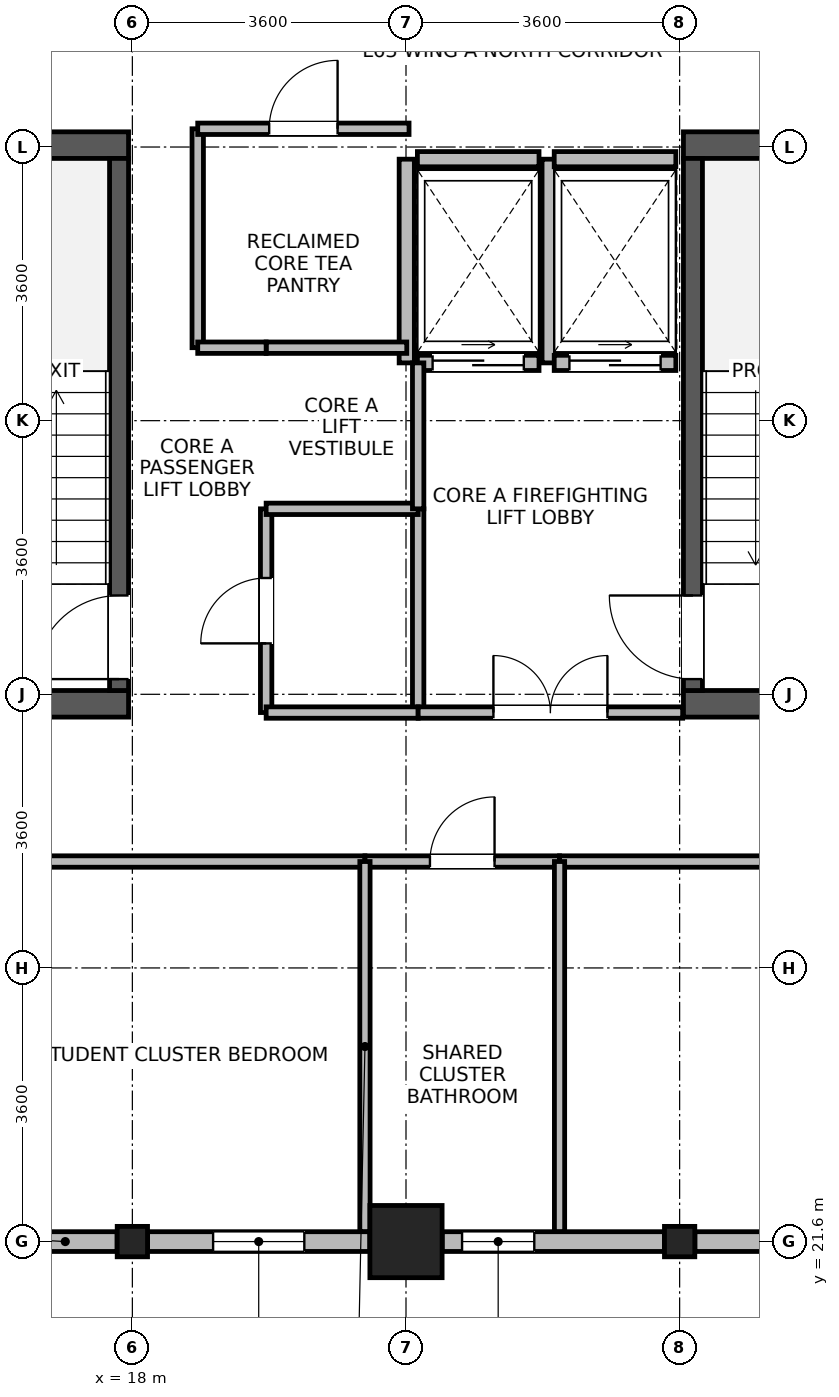
"""IFC4 building model, lengths in metres.
Left out: names, types, materials, properties, quantities, classifications, styles, units other than length and angle.
Written with IfcOpenShell. Run it as: python <this file> out.ifc"""

import sys

from ifc_helpers import new_model, si_unit, direction, frame, frame_2d, origin, origin_2d, place, context, subcontext, project, spatial, rectangle, i_section, extrude, source, transform, mapped, element, fill, save


model = new_model("IFC4")
c1 = context("Model", 3, precision=1e-05, world=origin(), true_north=direction((0.0, 1.0)))
c2 = subcontext(c1, "Body", "Model", "MODEL_VIEW")
j1 = project(units=[si_unit("LENGTHUNIT", "METRE"), si_unit("PLANEANGLEUNIT", "RADIAN")], contexts=[c1])
p1 = place(None, origin())
s1 = spatial("IfcSite", under=j1, at=p1, CompositionType="ELEMENT")
p2 = place(p1, origin())
s2 = spatial("IfcBuilding", under=s1, at=p2, CompositionType="ELEMENT")
p3 = place(p2, frame((0.0, 0.0, 246.2)))
s3 = spatial("IfcBuildingStorey", under=s2, at=p3, CompositionType="ELEMENT", Elevation=246.2)
for number, where, z_axis, x_axis in (
    (1, (14.75, 28.675, 0.0), (0.0, 0.0, 1.0), (1.0, 0.0, 0.0)),
    (2, (25.25, 28.675, 0.0), (0.0, 0.0, 1.0), (1.0, 0.0, 0.0)),
    (3, (14.75, 36.025, 0.0), (0.0, 0.0, 1.0), (1.0, 0.0, 0.0)),
    (4, (25.25, 36.025, 0.0), (0.0, 0.0, 1.0), (1.0, 0.0, 0.0)),
):
    element("IfcWall", number, at=place(p3, frame(where, z_axis=z_axis, x_axis=x_axis)), inside=s3, PredefinedType="SHEAR", context=c2, shape_type="SweptSolid", body=[
        extrude(rectangle(XDim=3.2, YDim=0.35, at=frame_2d((1.6, 0.0))), origin(), (0.0, 0.0, 1.0), 3.28),
    ])
p4 = place(p3, frame((17.825, 28.85, 0.0), z_axis=(0.0, 0.0, 1.0), x_axis=(0.0, 1.0, 0.0)))
e5 = element("IfcWall", 5, at=p4, inside=s3, PredefinedType="SHEAR", context=c2, shape_type="SweptSolid", body=[
    extrude(rectangle(XDim=7.0, YDim=0.25, at=frame_2d((3.5, 0.0))), origin(), (0.0, 0.0, 1.0), 3.28),
])
p5 = place(p4, frame((0.15, 0.0, 0.0)))
e6 = element("IfcOpeningElement", 6, at=p5, cuts=e5, PredefinedType="OPENING", context=c2, shape_type="SweptSolid", body=[
    extrude(rectangle(XDim=1.1, YDim=2.08, at=frame_2d((0.55, 1.04))), frame((0.0, 0.135, 0.0), z_axis=(0.0, -1.0, 0.0), x_axis=(1.0, 0.0, 0.0)), (0.0, 0.0, 1.0), 0.27),
])
p6 = place(p3, frame((25.375, 28.85, 0.0), z_axis=(0.0, 0.0, 1.0), x_axis=(0.0, 1.0, 0.0)))
e7 = element("IfcWall", 7, at=p6, inside=s3, PredefinedType="SHEAR", context=c2, shape_type="SweptSolid", body=[
    extrude(rectangle(XDim=7.0, YDim=0.25, at=frame_2d((3.5, 0.0))), origin(), (0.0, 0.0, 1.0), 3.28),
])
p7 = place(p6, frame((0.15, 0.0, 0.0)))
e8 = element("IfcOpeningElement", 8, at=p7, cuts=e7, PredefinedType="OPENING", context=c2, shape_type="SweptSolid", body=[
    extrude(rectangle(XDim=1.1, YDim=2.08, at=frame_2d((0.55, 1.04))), frame((0.0, 0.135, 0.0), z_axis=(0.0, -1.0, 0.0), x_axis=(1.0, 0.0, 0.0)), (0.0, 0.0, 1.0), 0.27),
])
m1 = source(origin(), c2, "Body", "SweptSolid", [
    extrude(rectangle(XDim=0.95, YDim=0.95, at=origin_2d()), origin(), (0.0, 0.0, 1.0), 3.7),
])
p8 = place(p3, frame((21.6, 21.6, 0.0), z_axis=(0.0, 0.0, 1.0), x_axis=(1.0, 0.0, 0.0)))
e9 = element("IfcColumn", 9, at=p8, inside=s3, PredefinedType="COLUMN", context=c2, shape_type="MappedRepresentation", body=[
    mapped(m1, transform((0.0, 0.0, 0.0), x_axis=(1.0, 0.0, 0.0), y_axis=(0.0, 1.0, 0.0), z_axis=(0.0, 0.0, 1.0), scale=1.0)),
])
m2 = source(origin(), c2, "Body", "SweptSolid", [
    extrude(i_section(OverallWidth=0.399, OverallDepth=0.4, WebThickness=0.017, FlangeThickness=0.023, FilletRadius=0.015, at=origin_2d()), origin(), (0.0, 0.0, 1.0), 3.7),
])
for number, where, z_axis, x_axis in (
    (10, (18.0, 21.6, 0.0), (0.0, 0.0, 1.0), (1.0, 0.0, 0.0)),
    (11, (25.2, 21.6, 0.0), (0.0, 0.0, 1.0), (1.0, 0.0, 0.0)),
):
    element("IfcColumn", number, at=place(p3, frame(where, z_axis=z_axis, x_axis=x_axis)), inside=s3, PredefinedType="COLUMN", context=c2, shape_type="MappedRepresentation", body=[
        mapped(m2, transform((0.0, 0.0, 0.0), x_axis=(1.0, 0.0, 0.0), y_axis=(0.0, 1.0, 0.0), z_axis=(0.0, 0.0, 1.0), scale=1.0)),
    ])
p9 = place(p3, frame((17.8, 21.6, 0.0), z_axis=(0.0, 0.0, 1.0), x_axis=(-1.0, 0.0, 0.0)))
e12 = element("IfcWall", 12, at=p9, inside=s3, PredefinedType="STANDARD", context=c2, shape_type="SweptSolid", body=[
    extrude(rectangle(XDim=1.365, YDim=0.26, at=frame_2d((0.682, 0.0))), origin(), (0.0, 0.0, 1.0), 2.86),
])
p10 = place(p3, frame((21.124, 21.6, 0.0), z_axis=(0.0, 0.0, 1.0), x_axis=(-1.0, 0.0, 0.0)))
e13 = element("IfcWall", 13, at=p10, inside=s3, PredefinedType="STANDARD", context=c2, shape_type="SweptSolid", body=[
    extrude(rectangle(XDim=2.924, YDim=0.26, at=frame_2d((1.462, 0.0))), origin(), (0.0, 0.0, 1.0), 2.86),
])
p11 = place(p10, frame((0.862, 0.0, 0.85)))
e14 = element("IfcOpeningElement", 14, at=p11, cuts=e13, PredefinedType="OPENING", context=c2, shape_type="SweptSolid", body=[
    extrude(rectangle(XDim=1.2, YDim=1.75, at=frame_2d((0.6, 0.875))), frame((0.0, 0.14, 0.0), z_axis=(0.0, -1.0, 0.0), x_axis=(1.0, 0.0, 0.0)), (0.0, 0.0, 1.0), 0.28),
])
p12 = place(p3, frame((25.0, 21.6, 0.0), z_axis=(0.0, 0.0, 1.0), x_axis=(-1.0, 0.0, 0.0)))
e15 = element("IfcWall", 15, at=p12, inside=s3, PredefinedType="STANDARD", context=c2, shape_type="SweptSolid", body=[
    extrude(rectangle(XDim=2.924, YDim=0.26, at=frame_2d((1.462, 0.0))), origin(), (0.0, 0.0, 1.0), 2.86),
])
p13 = place(p12, frame((1.712, 0.0, 0.85)))
e16 = element("IfcOpeningElement", 16, at=p13, cuts=e15, PredefinedType="OPENING", context=c2, shape_type="SweptSolid", body=[
    extrude(rectangle(XDim=0.95, YDim=1.75, at=frame_2d((0.475, 0.875))), frame((0.0, 0.14, 0.0), z_axis=(0.0, -1.0, 0.0), x_axis=(1.0, 0.0, 0.0)), (0.0, 0.0, 1.0), 0.28),
])
p14 = place(p3, frame((28.324, 21.6, 0.0), z_axis=(0.0, 0.0, 1.0), x_axis=(-1.0, 0.0, 0.0)))
e17 = element("IfcWall", 17, at=p14, inside=s3, PredefinedType="STANDARD", context=c2, shape_type="SweptSolid", body=[
    extrude(rectangle(XDim=2.924, YDim=0.26, at=frame_2d((1.462, 0.0))), origin(), (0.0, 0.0, 1.0), 2.86),
])
p15 = place(p14, frame((0.862, 0.0, 0.85)))
e18 = element("IfcOpeningElement", 18, at=p15, cuts=e17, PredefinedType="OPENING", context=c2, shape_type="SweptSolid", body=[
    extrude(rectangle(XDim=1.2, YDim=1.75, at=frame_2d((0.6, 0.875))), frame((0.0, 0.14, 0.0), z_axis=(0.0, -1.0, 0.0), x_axis=(1.0, 0.0, 0.0)), (0.0, 0.0, 1.0), 0.28),
])
p16 = place(p3, frame((21.75, 33.16, 0.0), z_axis=(0.0, 0.0, 1.0), x_axis=(1.0, 0.0, 0.0)))
e19 = element("IfcWall", 19, at=p16, inside=s3, PredefinedType="PARTITIONING", context=c2, shape_type="SweptSolid", body=[
    extrude(rectangle(XDim=1.6, YDim=0.2, at=frame_2d((0.8, 0.0))), origin(), (0.0, 0.0, 1.0), 3.26),
])
p17 = place(p16, frame((0.2, 0.0, 0.0)))
e20 = element("IfcOpeningElement", 20, at=p17, cuts=e19, PredefinedType="OPENING", context=c2, shape_type="SweptSolid", body=[
    extrude(rectangle(XDim=1.2, YDim=2.12, at=frame_2d((0.6, 1.06))), frame((0.0, 0.11, 0.0), z_axis=(0.0, -1.0, 0.0), x_axis=(1.0, 0.0, 0.0)), (0.0, 0.0, 1.0), 0.22),
])
p18 = place(p3, frame((21.75, 35.84, 0.0), z_axis=(0.0, 0.0, 1.0), x_axis=(1.0, 0.0, 0.0)))
e21 = element("IfcWall", 21, at=p18, inside=s3, PredefinedType="PARTITIONING", context=c2, shape_type="SweptSolid", body=[
    extrude(rectangle(XDim=1.6, YDim=0.2, at=frame_2d((0.8, 0.0))), origin(), (0.0, 0.0, 1.0), 2.36),
])
for number, where, z_axis, x_axis in (
    (22, (21.61, 33.16, 0.0), (0.0, 0.0, 1.0), (0.0, 1.0, 0.0)),
    (23, (23.49, 33.16, 0.0), (0.0, 0.0, 1.0), (0.0, 1.0, 0.0)),
):
    element("IfcWall", number, at=place(p3, frame(where, z_axis=z_axis, x_axis=x_axis)), inside=s3, PredefinedType="PARTITIONING", context=c2, shape_type="SweptSolid", body=[
        extrude(rectangle(XDim=2.68, YDim=0.2, at=frame_2d((1.34, 0.0))), origin(), (0.0, 0.0, 1.0), 3.26),
    ])
p19 = place(p3, frame((23.55, 33.16, 0.0), z_axis=(0.0, 0.0, 1.0), x_axis=(1.0, 0.0, 0.0)))
e24 = element("IfcWall", 24, at=p19, inside=s3, PredefinedType="PARTITIONING", context=c2, shape_type="SweptSolid", body=[
    extrude(rectangle(XDim=1.6, YDim=0.2, at=frame_2d((0.8, 0.0))), origin(), (0.0, 0.0, 1.0), 3.26),
])
p20 = place(p19, frame((0.2, 0.0, 0.0)))
e25 = element("IfcOpeningElement", 25, at=p20, cuts=e24, PredefinedType="OPENING", context=c2, shape_type="SweptSolid", body=[
    extrude(rectangle(XDim=1.2, YDim=2.12, at=frame_2d((0.6, 1.06))), frame((0.0, 0.11, 0.0), z_axis=(0.0, -1.0, 0.0), x_axis=(1.0, 0.0, 0.0)), (0.0, 0.0, 1.0), 0.22),
])
p21 = place(p3, frame((23.55, 35.84, 0.0), z_axis=(0.0, 0.0, 1.0), x_axis=(1.0, 0.0, 0.0)))
e26 = element("IfcWall", 26, at=p21, inside=s3, PredefinedType="PARTITIONING", context=c2, shape_type="SweptSolid", body=[
    extrude(rectangle(XDim=1.6, YDim=0.2, at=frame_2d((0.8, 0.0))), origin(), (0.0, 0.0, 1.0), 2.36),
])
p22 = place(p3, frame((23.62, 26.6, 0.0), z_axis=(0.0, 0.0, 1.0), x_axis=(1.0, 0.0, 0.0)))
e27 = element("IfcWall", 27, at=p22, inside=s3, PredefinedType="PARTITIONING", context=c2, shape_type="SweptSolid", body=[
    extrude(rectangle(XDim=15.46, YDim=0.15, at=frame_2d((7.73, 0.0))), origin(), (0.0, 0.0, 1.0), 3.26),
])
p23 = place(p22, frame((7.255, 0.0, 0.0)))
e28 = element("IfcOpeningElement", 28, at=p23, cuts=e27, PredefinedType="OPENING", context=c2, shape_type="SweptSolid", body=[
    extrude(rectangle(XDim=0.95, YDim=2.1, at=frame_2d((0.475, 1.05))), frame((0.0, 0.085, 0.0), z_axis=(0.0, -1.0, 0.0), x_axis=(1.0, 0.0, 0.0)), (0.0, 0.0, 1.0), 0.17),
])
p24 = place(p3, frame((6.832, 26.6, 0.0), z_axis=(0.0, 0.0, 1.0), x_axis=(1.0, 0.0, 0.0)))
e29 = element("IfcWall", 29, at=p24, inside=s3, PredefinedType="PARTITIONING", context=c2, shape_type="SweptSolid", body=[
    extrude(rectangle(XDim=14.228, YDim=0.15, at=frame_2d((7.114, 0.0))), origin(), (0.0, 0.0, 1.0), 3.26),
])
p25 = place(p24, frame((6.639, 0.0, 0.0)))
e30 = element("IfcOpeningElement", 30, at=p25, cuts=e29, PredefinedType="OPENING", context=c2, shape_type="SweptSolid", body=[
    extrude(rectangle(XDim=0.95, YDim=2.1, at=frame_2d((0.475, 1.05))), frame((0.0, 0.085, 0.0), z_axis=(0.0, -1.0, 0.0), x_axis=(1.0, 0.0, 0.0)), (0.0, 0.0, 1.0), 0.17),
])
p26 = place(p3, frame((18.86, 33.36, 0.0), z_axis=(0.0, 0.0, 1.0), x_axis=(0.0, 1.0, 0.0)))
e31 = element("IfcWall", 31, at=p26, inside=s3, PredefinedType="PARTITIONING", context=c2, shape_type="SweptSolid", body=[
    extrude(rectangle(XDim=2.88, YDim=0.15, at=frame_2d((1.44, 0.0))), origin(), (0.0, 0.0, 1.0), 3.26),
])
p27 = place(p3, frame((18.86, 36.24, 0.0), z_axis=(0.0, 0.0, 1.0), x_axis=(1.0, 0.0, 0.0)))
e32 = element("IfcWall", 32, at=p27, inside=s3, PredefinedType="PARTITIONING", context=c2, shape_type="SweptSolid", body=[
    extrude(rectangle(XDim=2.78, YDim=0.15, at=frame_2d((1.39, 0.0))), origin(), (0.0, 0.0, 1.0), 2.36),
])
p28 = place(p27, frame((0.94, 0.0, 0.0)))
e33 = element("IfcOpeningElement", 33, at=p28, cuts=e32, PredefinedType="OPENING", context=c2, shape_type="SweptSolid", body=[
    extrude(rectangle(XDim=0.9, YDim=2.08, at=frame_2d((0.45, 1.04))), frame((0.0, 0.085, 0.0), z_axis=(0.0, -1.0, 0.0), x_axis=(1.0, 0.0, 0.0)), (0.0, 0.0, 1.0), 0.17),
])
p29 = place(p3, frame((19.76, 28.56, 0.0), z_axis=(0.0, 0.0, 1.0), x_axis=(0.0, 1.0, 0.0)))
e34 = element("IfcWall", 34, at=p29, inside=s3, PredefinedType="PARTITIONING", context=c2, shape_type="SweptSolid", body=[
    extrude(rectangle(XDim=2.68, YDim=0.15, at=frame_2d((1.34, 0.0))), origin(), (0.0, 0.0, 1.0), 3.26),
])
p30 = place(p29, frame((0.91, 0.0, 0.0)))
e35 = element("IfcOpeningElement", 35, at=p30, cuts=e34, PredefinedType="OPENING", context=c2, shape_type="SweptSolid", body=[
    extrude(rectangle(XDim=0.86, YDim=2.02, at=frame_2d((0.43, 1.01))), frame((0.0, 0.085, 0.0), z_axis=(0.0, -1.0, 0.0), x_axis=(1.0, 0.0, 0.0)), (0.0, 0.0, 1.0), 0.17),
])
p31 = place(p3, frame((21.76, 28.56, 0.0), z_axis=(0.0, 0.0, 1.0), x_axis=(0.0, 1.0, 0.0)))
e36 = element("IfcWall", 36, at=p31, inside=s3, PredefinedType="PARTITIONING", context=c2, shape_type="SweptSolid", body=[
    extrude(rectangle(XDim=2.68, YDim=0.15, at=frame_2d((1.34, 0.0))), origin(), (0.0, 0.0, 1.0), 3.26),
])
p32 = place(p3, frame((21.06, 26.6, 0.0), z_axis=(0.0, 0.0, 1.0), x_axis=(1.0, 0.0, 0.0)))
e37 = element("IfcWall", 37, at=p32, inside=s3, PredefinedType="PARTITIONING", context=c2, shape_type="SweptSolid", body=[
    extrude(rectangle(XDim=2.56, YDim=0.15, at=frame_2d((1.28, 0.0))), origin(), (0.0, 0.0, 1.0), 3.26),
])
p33 = place(p32, frame((0.855, 0.0, 0.0)))
e38 = element("IfcOpeningElement", 38, at=p33, cuts=e37, PredefinedType="OPENING", context=c2, shape_type="SweptSolid", body=[
    extrude(rectangle(XDim=0.85, YDim=2.04, at=frame_2d((0.425, 1.02))), frame((0.0, 0.085, 0.0), z_axis=(0.0, -1.0, 0.0), x_axis=(1.0, 0.0, 0.0)), (0.0, 0.0, 1.0), 0.17),
])
p34 = place(p3, frame((19.76, 28.56, 0.0), z_axis=(0.0, 0.0, 1.0), x_axis=(1.0, 0.0, 0.0)))
e39 = element("IfcWall", 39, at=p34, inside=s3, PredefinedType="PARTITIONING", context=c2, shape_type="SweptSolid", body=[
    extrude(rectangle(XDim=2.0, YDim=0.15, at=frame_2d((1.0, 0.0))), origin(), (0.0, 0.0, 1.0), 2.36),
])
p35 = place(p3, frame((19.76, 31.24, 0.0), z_axis=(0.0, 0.0, 1.0), x_axis=(1.0, 0.0, 0.0)))
e40 = element("IfcWall", 40, at=p35, inside=s3, PredefinedType="PARTITIONING", context=c2, shape_type="SweptSolid", body=[
    extrude(rectangle(XDim=2.0, YDim=0.15, at=frame_2d((1.0, 0.0))), origin(), (0.0, 0.0, 1.0), 3.26),
])
p36 = place(p3, frame((19.76, 33.36, 0.0), z_axis=(0.0, 0.0, 1.0), x_axis=(1.0, 0.0, 0.0)))
e41 = element("IfcWall", 41, at=p36, inside=s3, PredefinedType="PARTITIONING", context=c2, shape_type="SweptSolid", body=[
    extrude(rectangle(XDim=1.85, YDim=0.15, at=frame_2d((0.925, 0.0))), origin(), (0.0, 0.0, 1.0), 3.26),
])
p37 = place(p3, frame((18.86, 33.36, 0.0), z_axis=(0.0, 0.0, 1.0), x_axis=(1.0, 0.0, 0.0)))
e42 = element("IfcWall", 42, at=p37, inside=s3, PredefinedType="PARTITIONING", context=c2, shape_type="SweptSolid", body=[
    extrude(rectangle(XDim=0.9, YDim=0.15, at=frame_2d((0.45, 0.0))), origin(), (0.0, 0.0, 1.0), 3.26),
])
for number, where, z_axis, x_axis in (
    (43, (21.06, 21.732, 0.0), (0.0, 0.0, 1.0), (0.0, 1.0, 0.0)),
    (44, (23.62, 21.732, 0.0), (0.0, 0.0, 1.0), (0.0, 1.0, 0.0)),
):
    element("IfcWall", number, at=place(p3, frame(where, z_axis=z_axis, x_axis=x_axis)), inside=s3, PredefinedType="PARTITIONING", context=c2, shape_type="SweptSolid", body=[
        extrude(rectangle(XDim=4.868, YDim=0.135, at=frame_2d((2.434, 0.0))), origin(), (0.0, 0.0, 1.0), 3.26),
    ])
p38 = place(p3, frame((21.76, 28.56, 0.0), z_axis=(0.0, 0.0, 1.0), x_axis=(1.0, 0.0, 0.0)))
e45 = element("IfcWall", 45, at=p38, inside=s3, PredefinedType="PARTITIONING", context=c2, shape_type="SweptSolid", body=[
    extrude(rectangle(XDim=3.48, YDim=0.15, at=frame_2d((1.74, 0.0))), origin(), (0.0, 0.0, 1.0), 2.36),
])
p39 = place(p38, frame((0.99, 0.0, 0.0)))
e46 = element("IfcOpeningElement", 46, at=p39, cuts=e45, PredefinedType="OPENING", context=c2, shape_type="SweptSolid", body=[
    extrude(rectangle(XDim=1.5, YDim=2.1, at=frame_2d((0.75, 1.05))), frame((0.0, 0.085, 0.0), z_axis=(0.0, -1.0, 0.0), x_axis=(1.0, 0.0, 0.0)), (0.0, 0.0, 1.0), 0.17),
])
p40 = place(p3, frame((21.76, 31.24, 0.0), z_axis=(0.0, 0.0, 1.0), x_axis=(0.0, 1.0, 0.0)))
e47 = element("IfcWall", 47, at=p40, inside=s3, PredefinedType="PARTITIONING", context=c2, shape_type="SweptSolid", body=[
    extrude(rectangle(XDim=1.92, YDim=0.15, at=frame_2d((0.96, 0.0))), origin(), (0.0, 0.0, 1.0), 3.26),
])
p41 = place(p11, origin())
e48 = element("IfcWindow", 48, at=p41, inside=s3, PartitioningType="SINGLE_PANEL", PredefinedType="WINDOW", context=c2, shape_type="SweptSolid", body=[
    extrude(rectangle(XDim=1.2, YDim=1.75, at=frame_2d((0.6, 0.875))), frame((0.0, 0.03, 0.0), z_axis=(0.0, -1.0, 0.0), x_axis=(1.0, 0.0, 0.0)), (0.0, 0.0, 1.0), 0.06),
])
fill(e14, e48)
p42 = place(p13, origin())
e49 = element("IfcWindow", 49, at=p42, inside=s3, PartitioningType="SINGLE_PANEL", PredefinedType="WINDOW", context=c2, shape_type="SweptSolid", body=[
    extrude(rectangle(XDim=0.95, YDim=1.75, at=frame_2d((0.475, 0.875))), frame((0.0, 0.03, 0.0), z_axis=(0.0, -1.0, 0.0), x_axis=(1.0, 0.0, 0.0)), (0.0, 0.0, 1.0), 0.06),
])
fill(e16, e49)
p43 = place(p5, origin())
e50 = element("IfcDoor", 50, at=p43, inside=s3, OperationType="SINGLE_SWING_LEFT", PredefinedType="DOOR", context=c2, shape_type="SweptSolid", body=[
    extrude(rectangle(XDim=1.1, YDim=2.08, at=frame_2d((0.55, 1.04))), frame((0.0, 0.025, 0.0), z_axis=(0.0, -1.0, 0.0), x_axis=(1.0, 0.0, 0.0)), (0.0, 0.0, 1.0), 0.05),
])
fill(e6, e50)
p44 = place(p7, origin())
e51 = element("IfcDoor", 51, at=p44, inside=s3, OperationType="SINGLE_SWING_RIGHT", PredefinedType="DOOR", context=c2, shape_type="SweptSolid", body=[
    extrude(rectangle(XDim=1.1, YDim=2.08, at=frame_2d((0.55, 1.04))), frame((0.0, 0.025, 0.0), z_axis=(0.0, -1.0, 0.0), x_axis=(1.0, 0.0, 0.0)), (0.0, 0.0, 1.0), 0.05),
])
fill(e8, e51)
p45 = place(p17, origin())
e52 = element("IfcDoor", 52, at=p45, inside=s3, OperationType="SLIDING_TO_RIGHT", PredefinedType="DOOR", context=c2, shape_type="SweptSolid", body=[
    extrude(rectangle(XDim=1.2, YDim=2.12, at=frame_2d((0.6, 1.06))), frame((0.0, 0.025, 0.0), z_axis=(0.0, -1.0, 0.0), x_axis=(1.0, 0.0, 0.0)), (0.0, 0.0, 1.0), 0.05),
])
fill(e20, e52)
p46 = place(p20, origin())
e53 = element("IfcDoor", 53, at=p46, inside=s3, OperationType="SLIDING_TO_RIGHT", PredefinedType="DOOR", context=c2, shape_type="SweptSolid", body=[
    extrude(rectangle(XDim=1.2, YDim=2.12, at=frame_2d((0.6, 1.06))), frame((0.0, 0.025, 0.0), z_axis=(0.0, -1.0, 0.0), x_axis=(1.0, 0.0, 0.0)), (0.0, 0.0, 1.0), 0.05),
])
fill(e25, e53)
p47 = place(p28, origin())
e54 = element("IfcDoor", 54, at=p47, inside=s3, OperationType="SINGLE_SWING_RIGHT", PredefinedType="DOOR", context=c2, shape_type="SweptSolid", body=[
    extrude(rectangle(XDim=0.9, YDim=2.08, at=frame_2d((0.45, 1.04))), frame((0.0, 0.025, 0.0), z_axis=(0.0, -1.0, 0.0), x_axis=(1.0, 0.0, 0.0)), (0.0, 0.0, 1.0), 0.05),
])
fill(e33, e54)
p48 = place(p30, origin())
e55 = element("IfcDoor", 55, at=p48, inside=s3, OperationType="SINGLE_SWING_LEFT", PredefinedType="DOOR", context=c2, shape_type="SweptSolid", body=[
    extrude(rectangle(XDim=0.86, YDim=2.02, at=frame_2d((0.43, 1.01))), frame((0.0, 0.025, 0.0), z_axis=(0.0, -1.0, 0.0), x_axis=(1.0, 0.0, 0.0)), (0.0, 0.0, 1.0), 0.05),
])
fill(e35, e55)
p49 = place(p33, origin())
e56 = element("IfcDoor", 56, at=p49, inside=s3, OperationType="SINGLE_SWING_RIGHT", PredefinedType="DOOR", context=c2, shape_type="SweptSolid", body=[
    extrude(rectangle(XDim=0.85, YDim=2.04, at=frame_2d((0.425, 1.02))), frame((0.0, 0.025, 0.0), z_axis=(0.0, -1.0, 0.0), x_axis=(1.0, 0.0, 0.0)), (0.0, 0.0, 1.0), 0.05),
])
fill(e38, e56)
p50 = place(p39, origin())
e57 = element("IfcDoor", 57, at=p50, inside=s3, OperationType="DOUBLE_DOOR_SINGLE_SWING", PredefinedType="DOOR", context=c2, shape_type="SweptSolid", body=[
    extrude(rectangle(XDim=1.5, YDim=2.1, at=frame_2d((0.75, 1.05))), frame((0.0, 0.025, 0.0), z_axis=(0.0, -1.0, 0.0), x_axis=(1.0, 0.0, 0.0)), (0.0, 0.0, 1.0), 0.05),
])
fill(e46, e57)
save(model, sys.argv[1])
